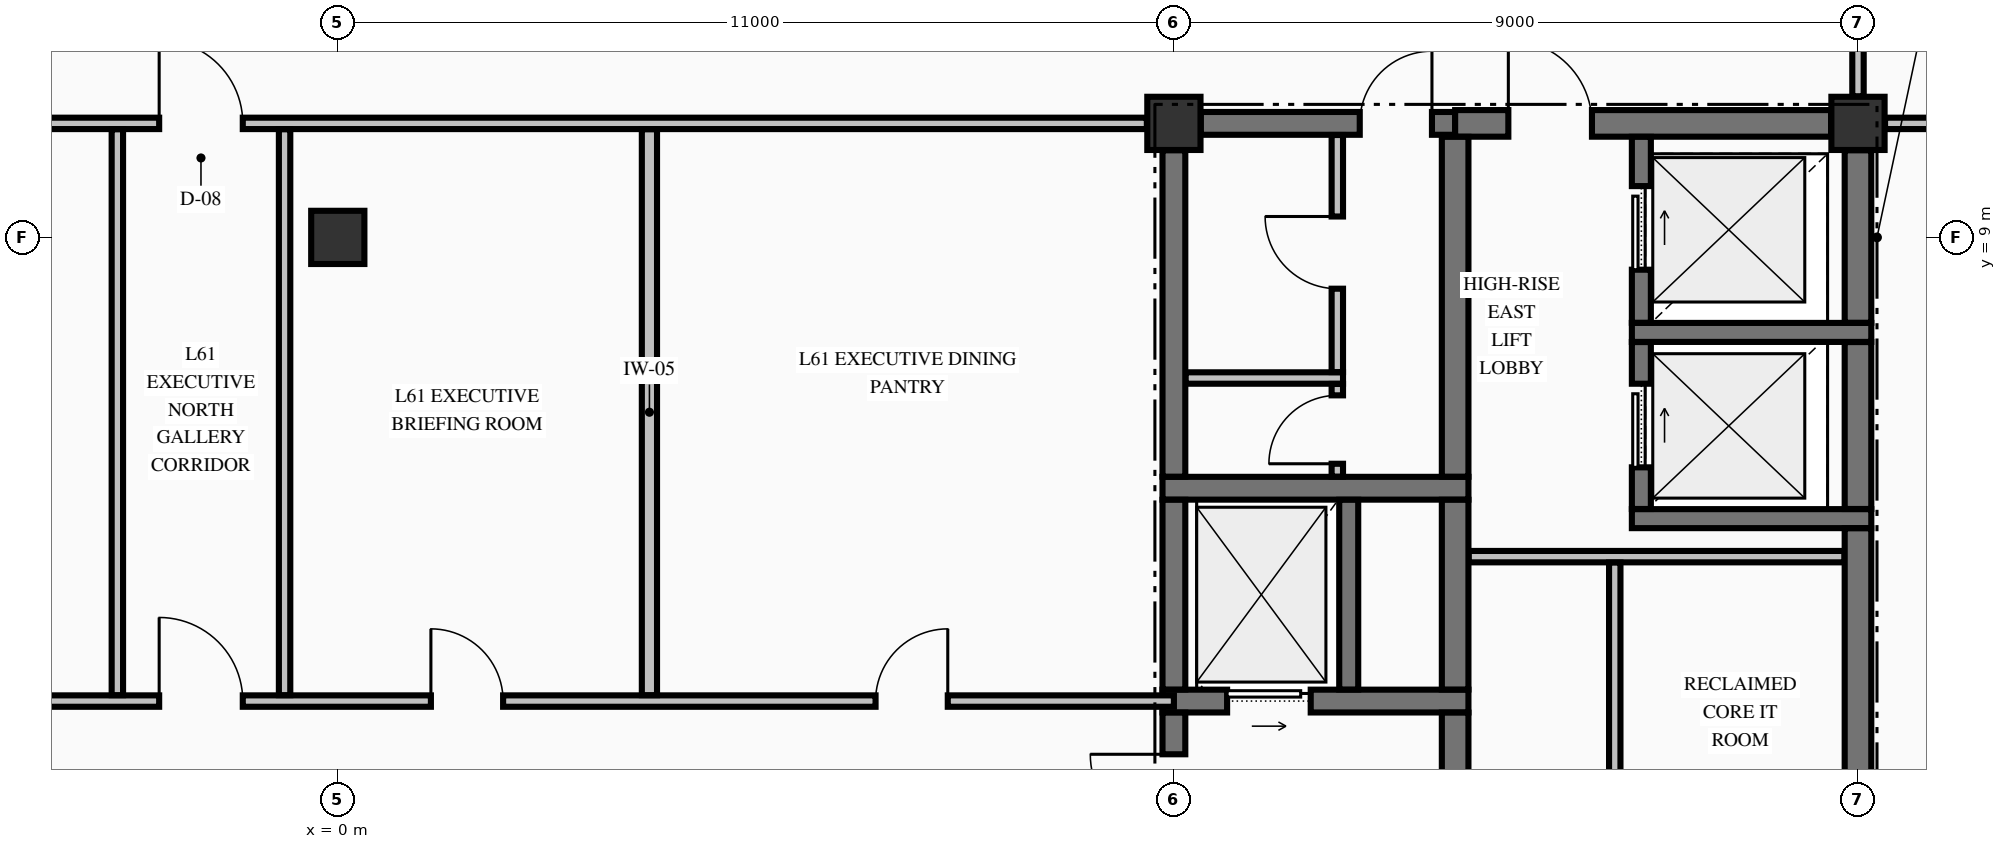
"""IFC4 building model, lengths in metres.
Left out: names, types, materials, properties, quantities, classifications, styles, units other than length and angle.
Written with IfcOpenShell. Run it as: python <this file> out.ifc"""

import sys

from ifc_helpers import new_model, si_unit, direction, frame, frame_2d, origin, origin_2d, place, context, subcontext, project, spatial, rectangle, extrude, element, fill, save


model = new_model("IFC4")
c1 = context("Model", 3, precision=1e-05, world=origin(), true_north=direction((0.0, 1.0)))
c2 = subcontext(c1, "Body", "Model", "MODEL_VIEW")
j1 = project(units=[si_unit("LENGTHUNIT", "METRE"), si_unit("PLANEANGLEUNIT", "RADIAN")], contexts=[c1])
p1 = place(None, origin())
s1 = spatial("IfcSite", under=j1, at=p1, CompositionType="ELEMENT")
p2 = place(p1, origin())
s2 = spatial("IfcBuilding", under=s1, at=p2, CompositionType="ELEMENT")
p3 = place(p2, frame((0.0, 0.0, 233.28)))
s3 = spatial("IfcBuildingStorey", under=s2, at=p3, CompositionType="ELEMENT", Elevation=233.28)
for number, where, z_axis, x_axis in (
    (1, (11.0, 10.5, -0.25), (0.0, 0.0, 1.0), (1.0, 0.0, 0.0)),
    (2, (20.0, 10.5, -0.25), (0.0, 0.0, 1.0), (1.0, 0.0, 0.0)),
    (3, (0.0, 9.0, -0.25), (0.0, 0.0, 1.0), (1.0, 0.0, 0.0)),
):
    element("IfcColumn", number, at=place(p3, frame(where, z_axis=z_axis, x_axis=x_axis)), inside=s3, PredefinedType="COLUMN", context=c2, shape_type="SweptSolid", body=[
        extrude(rectangle(XDim=0.7, YDim=0.7, at=origin_2d()), origin(), (0.0, 0.0, 1.0), 3.23),
    ])
p4 = place(p3, frame((10.85, 2.9, 0.0), z_axis=(0.0, 0.0, 1.0), x_axis=(1.0, 0.0, 0.0)))
e4 = element("IfcWall", 4, at=p4, inside=s3, PredefinedType="SHEAR", context=c2, shape_type="SweptSolid", body=[
    extrude(rectangle(XDim=4.025, YDim=0.3, at=frame_2d((2.012, 0.0))), origin(), (0.0, 0.0, 1.0), 2.98),
])
p5 = place(p4, frame((0.85, 0.0, 0.0)))
e5 = element("IfcOpeningElement", 5, at=p5, cuts=e4, PredefinedType="OPENING", context=c2, shape_type="SweptSolid", body=[
    extrude(rectangle(XDim=1.1, YDim=2.2, at=frame_2d((0.55, 1.1))), frame((0.0, 0.16, 0.0), z_axis=(0.0, -1.0, 0.0), x_axis=(1.0, 0.0, 0.0)), (0.0, 0.0, 1.0), 0.32),
])
p6 = place(p3, frame((17.025, 5.3, 0.0), z_axis=(0.0, 0.0, 1.0), x_axis=(1.0, 0.0, 0.0)))
e6 = element("IfcWall", 6, at=p6, inside=s3, PredefinedType="SOLIDWALL", context=c2, shape_type="SweptSolid", body=[
    extrude(rectangle(XDim=3.15, YDim=0.25, at=frame_2d((1.575, 0.0))), origin(), (0.0, 0.0, 1.0), 2.98),
])
p7 = place(p3, frame((10.85, 5.7, 0.0), z_axis=(0.0, 0.0, 1.0), x_axis=(1.0, 0.0, 0.0)))
e7 = element("IfcWall", 7, at=p7, inside=s3, PredefinedType="SHEAR", context=c2, shape_type="SweptSolid", body=[
    extrude(rectangle(XDim=4.025, YDim=0.3, at=frame_2d((2.012, 0.0))), origin(), (0.0, 0.0, 1.0), 2.98),
])
p8 = place(p3, frame((17.025, 7.75, 0.0), z_axis=(0.0, 0.0, 1.0), x_axis=(1.0, 0.0, 0.0)))
e8 = element("IfcWall", 8, at=p8, inside=s3, PredefinedType="SOLIDWALL", context=c2, shape_type="SweptSolid", body=[
    extrude(rectangle(XDim=3.15, YDim=0.25, at=frame_2d((1.575, 0.0))), origin(), (0.0, 0.0, 1.0), 2.98),
])
p9 = place(p3, frame((11.354, 10.5, 0.0), z_axis=(0.0, 0.0, 1.0), x_axis=(1.0, 0.0, 0.0)))
e9 = element("IfcWall", 9, at=p9, inside=s3, PredefinedType="SHEAR", context=c2, shape_type="SweptSolid", body=[
    extrude(rectangle(XDim=3.346, YDim=0.3, at=frame_2d((1.673, 0.0))), origin(), (0.0, 0.0, 1.0), 2.98),
])
p10 = place(p9, frame((2.091, 0.0, 0.0)))
e10 = element("IfcOpeningElement", 10, at=p10, cuts=e9, PredefinedType="OPENING", context=c2, shape_type="SweptSolid", body=[
    extrude(rectangle(XDim=0.95, YDim=2.15, at=frame_2d((0.475, 1.075))), frame((0.0, 0.16, 0.0), z_axis=(0.0, -1.0, 0.0), x_axis=(1.0, 0.0, 0.0)), (0.0, 0.0, 1.0), 0.32),
])
p11 = place(p3, frame((14.7, 10.5, 0.0), z_axis=(0.0, 0.0, 1.0), x_axis=(1.0, 0.0, 0.0)))
e11 = element("IfcWall", 11, at=p11, inside=s3, PredefinedType="SHEAR", context=c2, shape_type="SweptSolid", body=[
    extrude(rectangle(XDim=4.946, YDim=0.35, at=frame_2d((2.473, 0.0))), origin(), (0.0, 0.0, 1.0), 2.98),
])
p12 = place(p11, frame((0.7, 0.0, 0.0)))
e12 = element("IfcOpeningElement", 12, at=p12, cuts=e11, PredefinedType="OPENING", context=c2, shape_type="SweptSolid", body=[
    extrude(rectangle(XDim=1.1, YDim=2.15, at=frame_2d((0.55, 1.075))), frame((0.0, 0.185, 0.0), z_axis=(0.0, -1.0, 0.0), x_axis=(1.0, 0.0, 0.0)), (0.0, 0.0, 1.0), 0.37),
])
p13 = place(p3, frame((-11.0, 2.9, 0.0), z_axis=(0.0, 0.0, 1.0), x_axis=(1.0, 0.0, 0.0)))
e13 = element("IfcWall", 13, at=p13, inside=s3, PredefinedType="PARTITIONING", context=c2, shape_type="SweptSolid", body=[
    extrude(rectangle(XDim=22.0, YDim=0.15, at=frame_2d((11.0, 0.0))), origin(), (0.0, 0.0, 1.0), 2.98),
])
p14 = place(p13, frame((8.65, 0.0, 0.0)))
e14 = element("IfcOpeningElement", 14, at=p14, cuts=e13, PredefinedType="OPENING", context=c2, shape_type="SweptSolid", body=[
    extrude(rectangle(XDim=1.1, YDim=2.15, at=frame_2d((0.55, 1.075))), frame((0.0, 0.085, 0.0), z_axis=(0.0, -1.0, 0.0), x_axis=(1.0, 0.0, 0.0)), (0.0, 0.0, 1.0), 0.17),
])
p15 = place(p13, frame((3.525, 0.0, 0.0)))
e15 = element("IfcOpeningElement", 15, at=p15, cuts=e13, PredefinedType="OPENING", context=c2, shape_type="SweptSolid", body=[
    extrude(rectangle(XDim=1.05, YDim=2.15, at=frame_2d((0.525, 1.075))), frame((0.0, 0.085, 0.0), z_axis=(0.0, -1.0, 0.0), x_axis=(1.0, 0.0, 0.0)), (0.0, 0.0, 1.0), 0.17),
])
p16 = place(p13, frame((12.225, 0.0, 0.0)))
e16 = element("IfcOpeningElement", 16, at=p16, cuts=e13, PredefinedType="OPENING", context=c2, shape_type="SweptSolid", body=[
    extrude(rectangle(XDim=0.95, YDim=2.15, at=frame_2d((0.475, 1.075))), frame((0.0, 0.085, 0.0), z_axis=(0.0, -1.0, 0.0), x_axis=(1.0, 0.0, 0.0)), (0.0, 0.0, 1.0), 0.17),
])
p17 = place(p13, frame((18.075, 0.0, 0.0)))
e17 = element("IfcOpeningElement", 17, at=p17, cuts=e13, PredefinedType="OPENING", context=c2, shape_type="SweptSolid", body=[
    extrude(rectangle(XDim=0.95, YDim=2.15, at=frame_2d((0.475, 1.075))), frame((0.0, 0.085, 0.0), z_axis=(0.0, -1.0, 0.0), x_axis=(1.0, 0.0, 0.0)), (0.0, 0.0, 1.0), 0.17),
])
p18 = place(p3, frame((14.878, 4.8, 0.0), z_axis=(0.0, 0.0, 1.0), x_axis=(1.0, 0.0, 0.0)))
e18 = element("IfcWall", 18, at=p18, inside=s3, PredefinedType="PARTITIONING", context=c2, shape_type="SweptSolid", body=[
    extrude(rectangle(XDim=4.944, YDim=0.15, at=frame_2d((2.472, 0.0))), origin(), (0.0, 0.0, 1.0), 2.98),
])
p19 = place(p3, frame((11.153, 7.15, 0.0), z_axis=(0.0, 0.0, 1.0), x_axis=(1.0, 0.0, 0.0)))
e19 = element("IfcWall", 19, at=p19, inside=s3, PredefinedType="PARTITIONING", context=c2, shape_type="SweptSolid", body=[
    extrude(rectangle(XDim=2.072, YDim=0.15, at=frame_2d((1.036, 0.0))), origin(), (0.0, 0.0, 1.0), 2.98),
])
p20 = place(p3, frame((-10.644, 10.5, 0.0), z_axis=(0.0, 0.0, 1.0), x_axis=(1.0, 0.0, 0.0)))
e20 = element("IfcWall", 20, at=p20, inside=s3, PredefinedType="PARTITIONING", context=c2, shape_type="SweptSolid", body=[
    extrude(rectangle(XDim=21.288, YDim=0.15, at=frame_2d((10.644, 0.0))), origin(), (0.0, 0.0, 1.0), 2.98),
])
p21 = place(p20, frame((8.294, 0.0, 0.0)))
e21 = element("IfcOpeningElement", 21, at=p21, cuts=e20, PredefinedType="OPENING", context=c2, shape_type="SweptSolid", body=[
    extrude(rectangle(XDim=1.1, YDim=2.15, at=frame_2d((0.55, 1.075))), frame((0.0, 0.085, 0.0), z_axis=(0.0, -1.0, 0.0), x_axis=(1.0, 0.0, 0.0)), (0.0, 0.0, 1.0), 0.17),
])
p22 = place(p3, frame((20.356, 10.5, 0.0), z_axis=(0.0, 0.0, 1.0), x_axis=(1.0, 0.0, 0.0)))
e22 = element("IfcWall", 22, at=p22, inside=s3, PredefinedType="PARTITIONING", context=c2, shape_type="SweptSolid", body=[
    extrude(rectangle(XDim=5.479, YDim=0.15, at=frame_2d((2.74, 0.0))), origin(), (0.0, 0.0, 1.0), 2.98),
])
p23 = place(p22, frame((2.169, 0.0, 0.0)))
e23 = element("IfcOpeningElement", 23, at=p23, cuts=e22, PredefinedType="OPENING", context=c2, shape_type="SweptSolid", body=[
    extrude(rectangle(XDim=0.95, YDim=2.15, at=frame_2d((0.475, 1.075))), frame((0.0, 0.085, 0.0), z_axis=(0.0, -1.0, 0.0), x_axis=(1.0, 0.0, 0.0)), (0.0, 0.0, 1.0), 0.17),
])
p24 = place(p3, frame((11.0, 0.354, 0.0), z_axis=(0.0, 0.0, 1.0), x_axis=(0.0, 1.0, 0.0)))
e24 = element("IfcWall", 24, at=p24, inside=s3, PredefinedType="SHEAR", context=c2, shape_type="SweptSolid", body=[
    extrude(rectangle(XDim=2.394, YDim=0.3, at=frame_2d((1.197, 0.0))), origin(), (0.0, 0.0, 1.0), 2.98),
])
p25 = place(p24, frame((0.746, 0.0, 0.0)))
e25 = element("IfcOpeningElement", 25, at=p25, cuts=e24, PredefinedType="OPENING", context=c2, shape_type="SweptSolid", body=[
    extrude(rectangle(XDim=1.1, YDim=2.15, at=frame_2d((0.55, 1.075))), frame((0.0, 0.16, 0.0), z_axis=(0.0, -1.0, 0.0), x_axis=(1.0, 0.0, 0.0)), (0.0, 0.0, 1.0), 0.32),
])
p26 = place(p3, frame((11.0, 3.052, 0.0), z_axis=(0.0, 0.0, 1.0), x_axis=(0.0, 1.0, 0.0)))
e26 = element("IfcWall", 26, at=p26, inside=s3, PredefinedType="SHEAR", context=c2, shape_type="SweptSolid", body=[
    extrude(rectangle(XDim=2.496, YDim=0.3, at=frame_2d((1.248, 0.0))), origin(), (0.0, 0.0, 1.0), 2.98),
])
p27 = place(p3, frame((11.0, 5.852, 0.0), z_axis=(0.0, 0.0, 1.0), x_axis=(0.0, 1.0, 0.0)))
e27 = element("IfcWall", 27, at=p27, inside=s3, PredefinedType="SHEAR", context=c2, shape_type="SweptSolid", body=[
    extrude(rectangle(XDim=4.294, YDim=0.3, at=frame_2d((2.147, 0.0))), origin(), (0.0, 0.0, 1.0), 2.98),
])
p28 = place(p3, frame((13.3, 3.052, 0.0), z_axis=(0.0, 0.0, 1.0), x_axis=(0.0, 1.0, 0.0)))
e28 = element("IfcWall", 28, at=p28, inside=s3, PredefinedType="SOLIDWALL", context=c2, shape_type="SweptSolid", body=[
    extrude(rectangle(XDim=2.496, YDim=0.25, at=frame_2d((1.248, 0.0))), origin(), (0.0, 0.0, 1.0), 2.98),
])
p29 = place(p3, frame((14.7, -0.098, 0.0), z_axis=(0.0, 0.0, 1.0), x_axis=(0.0, 1.0, 0.0)))
e29 = element("IfcWall", 29, at=p29, inside=s3, PredefinedType="SHEAR", context=c2, shape_type="SweptSolid", body=[
    extrude(rectangle(XDim=2.846, YDim=0.35, at=frame_2d((1.423, 0.0))), origin(), (0.0, 0.0, 1.0), 2.98),
])
p30 = place(p3, frame((14.7, 3.052, 0.0), z_axis=(0.0, 0.0, 1.0), x_axis=(0.0, 1.0, 0.0)))
e30 = element("IfcWall", 30, at=p30, inside=s3, PredefinedType="SHEAR", context=c2, shape_type="SweptSolid", body=[
    extrude(rectangle(XDim=2.496, YDim=0.35, at=frame_2d((1.248, 0.0))), origin(), (0.0, 0.0, 1.0), 2.98),
])
p31 = place(p3, frame((14.7, 5.852, 0.0), z_axis=(0.0, 0.0, 1.0), x_axis=(0.0, 1.0, 0.0)))
e31 = element("IfcWall", 31, at=p31, inside=s3, PredefinedType="SHEAR", context=c2, shape_type="SweptSolid", body=[
    extrude(rectangle(XDim=4.471, YDim=0.35, at=frame_2d((2.235, 0.0))), origin(), (0.0, 0.0, 1.0), 2.98),
])
p32 = place(p3, frame((17.15, 5.427, 0.0), z_axis=(0.0, 0.0, 1.0), x_axis=(0.0, 1.0, 0.0)))
e32 = element("IfcWall", 32, at=p32, inside=s3, PredefinedType="SOLIDWALL", context=c2, shape_type="SweptSolid", body=[
    extrude(rectangle(XDim=2.196, YDim=0.25, at=frame_2d((1.098, 0.0))), origin(), (0.0, 0.0, 1.0), 2.98),
])
p33 = place(p32, frame((0.548, 0.0, 0.0)))
e33 = element("IfcOpeningElement", 33, at=p33, cuts=e32, PredefinedType="OPENING", context=c2, shape_type="SweptSolid", body=[
    extrude(rectangle(XDim=1.1, YDim=2.2, at=frame_2d((0.55, 1.1))), frame((0.0, 0.135, 0.0), z_axis=(0.0, -1.0, 0.0), x_axis=(1.0, 0.0, 0.0)), (0.0, 0.0, 1.0), 0.27),
])
p34 = place(p3, frame((17.15, 7.877, 0.0), z_axis=(0.0, 0.0, 1.0), x_axis=(0.0, 1.0, 0.0)))
e34 = element("IfcWall", 34, at=p34, inside=s3, PredefinedType="SOLIDWALL", context=c2, shape_type="SweptSolid", body=[
    extrude(rectangle(XDim=2.446, YDim=0.25, at=frame_2d((1.223, 0.0))), origin(), (0.0, 0.0, 1.0), 2.98),
])
p35 = place(p34, frame((0.698, 0.0, 0.0)))
e35 = element("IfcOpeningElement", 35, at=p35, cuts=e34, PredefinedType="OPENING", context=c2, shape_type="SweptSolid", body=[
    extrude(rectangle(XDim=1.1, YDim=2.2, at=frame_2d((0.55, 1.1))), frame((0.0, 0.135, 0.0), z_axis=(0.0, -1.0, 0.0), x_axis=(1.0, 0.0, 0.0)), (0.0, 0.0, 1.0), 0.27),
])
p36 = place(p3, frame((20.0, 0.354, 0.0), z_axis=(0.0, 0.0, 1.0), x_axis=(0.0, 1.0, 0.0)))
e36 = element("IfcWall", 36, at=p36, inside=s3, PredefinedType="SHEAR", context=c2, shape_type="SweptSolid", body=[
    extrude(rectangle(XDim=4.819, YDim=0.35, at=frame_2d((2.41, 0.0))), origin(), (0.0, 0.0, 1.0), 2.98),
])
p37 = place(p3, frame((20.0, 5.427, 0.0), z_axis=(0.0, 0.0, 1.0), x_axis=(0.0, 1.0, 0.0)))
e37 = element("IfcWall", 37, at=p37, inside=s3, PredefinedType="SHEAR", context=c2, shape_type="SweptSolid", body=[
    extrude(rectangle(XDim=2.196, YDim=0.35, at=frame_2d((1.098, 0.0))), origin(), (0.0, 0.0, 1.0), 2.98),
])
p38 = place(p3, frame((20.0, 7.877, 0.0), z_axis=(0.0, 0.0, 1.0), x_axis=(0.0, 1.0, 0.0)))
e38 = element("IfcWall", 38, at=p38, inside=s3, PredefinedType="SHEAR", context=c2, shape_type="SweptSolid", body=[
    extrude(rectangle(XDim=2.269, YDim=0.35, at=frame_2d((1.135, 0.0))), origin(), (0.0, 0.0, 1.0), 2.98),
])
for number, where, z_axis, x_axis in (
    (39, (-2.9, 2.978, 0.0), (0.0, 0.0, 1.0), (0.0, 1.0, 0.0)),
    (40, (-0.7, 2.978, 0.0), (0.0, 0.0, 1.0), (0.0, 1.0, 0.0)),
):
    element("IfcWall", number, at=place(p3, frame(where, z_axis=z_axis, x_axis=x_axis)), inside=s3, PredefinedType="PARTITIONING", context=c2, shape_type="SweptSolid", body=[
        extrude(rectangle(XDim=7.444, YDim=0.15, at=frame_2d((3.722, 0.0))), origin(), (0.0, 0.0, 1.0), 2.98),
    ])
p39 = place(p3, frame((4.1, 2.978, 0.0), z_axis=(0.0, 0.0, 1.0), x_axis=(0.0, 1.0, 0.0)))
e41 = element("IfcWall", 41, at=p39, inside=s3, PredefinedType="PARTITIONING", context=c2, shape_type="SweptSolid", body=[
    extrude(rectangle(XDim=7.444, YDim=0.2, at=frame_2d((3.722, 0.0))), origin(), (0.0, 0.0, 1.0), 2.98),
])
p40 = place(p3, frame((13.15, 5.853, 0.0), z_axis=(0.0, 0.0, 1.0), x_axis=(0.0, 1.0, 0.0)))
e42 = element("IfcWall", 42, at=p40, inside=s3, PredefinedType="PARTITIONING", context=c2, shape_type="SweptSolid", body=[
    extrude(rectangle(XDim=1.219, YDim=0.15, at=frame_2d((0.609, 0.0))), origin(), (0.0, 0.0, 1.0), 2.98),
])
p41 = place(p40, frame((0.169, 0.0, 0.0)))
e43 = element("IfcOpeningElement", 43, at=p41, cuts=e42, PredefinedType="OPENING", context=c2, shape_type="SweptSolid", body=[
    extrude(rectangle(XDim=0.9, YDim=2.15, at=frame_2d((0.45, 1.075))), frame((0.0, 0.085, 0.0), z_axis=(0.0, -1.0, 0.0), x_axis=(1.0, 0.0, 0.0)), (0.0, 0.0, 1.0), 0.17),
])
p42 = place(p3, frame((13.15, 7.228, 0.0), z_axis=(0.0, 0.0, 1.0), x_axis=(0.0, 1.0, 0.0)))
e44 = element("IfcWall", 44, at=p42, inside=s3, PredefinedType="PARTITIONING", context=c2, shape_type="SweptSolid", body=[
    extrude(rectangle(XDim=3.119, YDim=0.15, at=frame_2d((1.56, 0.0))), origin(), (0.0, 0.0, 1.0), 2.98),
])
p43 = place(p42, frame((1.097, 0.0, 0.0)))
e45 = element("IfcOpeningElement", 45, at=p43, cuts=e44, PredefinedType="OPENING", context=c2, shape_type="SweptSolid", body=[
    extrude(rectangle(XDim=0.95, YDim=2.15, at=frame_2d((0.475, 1.075))), frame((0.0, 0.085, 0.0), z_axis=(0.0, -1.0, 0.0), x_axis=(1.0, 0.0, 0.0)), (0.0, 0.0, 1.0), 0.17),
])
p44 = place(p3, frame((16.8, -2.422, 0.0), z_axis=(0.0, 0.0, 1.0), x_axis=(0.0, 1.0, 0.0)))
e46 = element("IfcWall", 46, at=p44, inside=s3, PredefinedType="PARTITIONING", context=c2, shape_type="SweptSolid", body=[
    extrude(rectangle(XDim=7.144, YDim=0.15, at=frame_2d((3.572, 0.0))), origin(), (0.0, 0.0, 1.0), 2.98),
])
p45 = place(p3, frame((20.0, 10.856, 0.0), z_axis=(0.0, 0.0, 1.0), x_axis=(0.0, 1.0, 0.0)))
e47 = element("IfcWall", 47, at=p45, inside=s3, PredefinedType="PARTITIONING", context=c2, shape_type="SweptSolid", body=[
    extrude(rectangle(XDim=2.666, YDim=0.15, at=frame_2d((1.333, 0.0))), origin(), (0.0, 0.0, 1.0), 2.98),
])
p46 = place(p45, frame((0.719, 0.0, 0.0)))
e48 = element("IfcOpeningElement", 48, at=p46, cuts=e47, PredefinedType="OPENING", context=c2, shape_type="SweptSolid", body=[
    extrude(rectangle(XDim=0.95, YDim=2.15, at=frame_2d((0.475, 1.075))), frame((0.0, 0.085, 0.0), z_axis=(0.0, -1.0, 0.0), x_axis=(1.0, 0.0, 0.0)), (0.0, 0.0, 1.0), 0.17),
])
p47 = place(p25, origin())
e49 = element("IfcDoor", 49, at=p47, inside=s3, OperationType="SINGLE_SWING_RIGHT", PredefinedType="DOOR", context=c2, shape_type="SweptSolid", body=[
    extrude(rectangle(XDim=1.1, YDim=2.15, at=frame_2d((0.55, 1.075))), frame((0.0, 0.025, 0.0), z_axis=(0.0, -1.0, 0.0), x_axis=(1.0, 0.0, 0.0)), (0.0, 0.0, 1.0), 0.05),
])
fill(e25, e49)
p48 = place(p5, origin())
e50 = element("IfcDoor", 50, at=p48, inside=s3, OperationType="SLIDING_TO_RIGHT", PredefinedType="DOOR", context=c2, shape_type="SweptSolid", body=[
    extrude(rectangle(XDim=1.1, YDim=2.2, at=frame_2d((0.55, 1.1))), frame((0.0, 0.025, 0.0), z_axis=(0.0, -1.0, 0.0), x_axis=(1.0, 0.0, 0.0)), (0.0, 0.0, 1.0), 0.05),
])
fill(e5, e50)
p49 = place(p10, origin())
e51 = element("IfcDoor", 51, at=p49, inside=s3, OperationType="SINGLE_SWING_RIGHT", PredefinedType="DOOR", context=c2, shape_type="SweptSolid", body=[
    extrude(rectangle(XDim=0.95, YDim=2.15, at=frame_2d((0.475, 1.075))), frame((0.0, 0.025, 0.0), z_axis=(0.0, -1.0, 0.0), x_axis=(1.0, 0.0, 0.0)), (0.0, 0.0, 1.0), 0.05),
])
fill(e10, e51)
p50 = place(p41, origin())
e52 = element("IfcDoor", 52, at=p50, inside=s3, OperationType="SINGLE_SWING_LEFT", PredefinedType="DOOR", context=c2, shape_type="SweptSolid", body=[
    extrude(rectangle(XDim=0.9, YDim=2.15, at=frame_2d((0.45, 1.075))), frame((0.0, 0.025, 0.0), z_axis=(0.0, -1.0, 0.0), x_axis=(1.0, 0.0, 0.0)), (0.0, 0.0, 1.0), 0.05),
])
fill(e43, e52)
p51 = place(p43, origin())
e53 = element("IfcDoor", 53, at=p51, inside=s3, OperationType="SINGLE_SWING_RIGHT", PredefinedType="DOOR", context=c2, shape_type="SweptSolid", body=[
    extrude(rectangle(XDim=0.95, YDim=2.15, at=frame_2d((0.475, 1.075))), frame((0.0, 0.025, 0.0), z_axis=(0.0, -1.0, 0.0), x_axis=(1.0, 0.0, 0.0)), (0.0, 0.0, 1.0), 0.05),
])
fill(e45, e53)
p52 = place(p33, origin())
e54 = element("IfcDoor", 54, at=p52, inside=s3, OperationType="SLIDING_TO_RIGHT", PredefinedType="DOOR", context=c2, shape_type="SweptSolid", body=[
    extrude(rectangle(XDim=1.1, YDim=2.2, at=frame_2d((0.55, 1.1))), frame((0.0, 0.025, 0.0), z_axis=(0.0, -1.0, 0.0), x_axis=(1.0, 0.0, 0.0)), (0.0, 0.0, 1.0), 0.05),
])
fill(e33, e54)
p53 = place(p35, origin())
e55 = element("IfcDoor", 55, at=p53, inside=s3, OperationType="SLIDING_TO_RIGHT", PredefinedType="DOOR", context=c2, shape_type="SweptSolid", body=[
    extrude(rectangle(XDim=1.1, YDim=2.2, at=frame_2d((0.55, 1.1))), frame((0.0, 0.025, 0.0), z_axis=(0.0, -1.0, 0.0), x_axis=(1.0, 0.0, 0.0)), (0.0, 0.0, 1.0), 0.05),
])
fill(e35, e55)
p54 = place(p12, origin())
e56 = element("IfcDoor", 56, at=p54, inside=s3, OperationType="SINGLE_SWING_LEFT", PredefinedType="DOOR", context=c2, shape_type="SweptSolid", body=[
    extrude(rectangle(XDim=1.1, YDim=2.15, at=frame_2d((0.55, 1.075))), frame((0.0, 0.025, 0.0), z_axis=(0.0, -1.0, 0.0), x_axis=(1.0, 0.0, 0.0)), (0.0, 0.0, 1.0), 0.05),
])
fill(e12, e56)
p55 = place(p21, origin())
e57 = element("IfcDoor", 57, at=p55, inside=s3, OperationType="SINGLE_SWING_LEFT", PredefinedType="DOOR", context=c2, shape_type="SweptSolid", body=[
    extrude(rectangle(XDim=1.1, YDim=2.15, at=frame_2d((0.55, 1.075))), frame((0.0, 0.025, 0.0), z_axis=(0.0, -1.0, 0.0), x_axis=(1.0, 0.0, 0.0)), (0.0, 0.0, 1.0), 0.05),
])
fill(e21, e57)
p56 = place(p14, origin())
e58 = element("IfcDoor", 58, at=p56, inside=s3, OperationType="SINGLE_SWING_LEFT", PredefinedType="DOOR", context=c2, shape_type="SweptSolid", body=[
    extrude(rectangle(XDim=1.1, YDim=2.15, at=frame_2d((0.55, 1.075))), frame((0.0, 0.025, 0.0), z_axis=(0.0, -1.0, 0.0), x_axis=(1.0, 0.0, 0.0)), (0.0, 0.0, 1.0), 0.05),
])
fill(e14, e58)
p57 = place(p16, origin())
e59 = element("IfcDoor", 59, at=p57, inside=s3, OperationType="SINGLE_SWING_LEFT", PredefinedType="DOOR", context=c2, shape_type="SweptSolid", body=[
    extrude(rectangle(XDim=0.95, YDim=2.15, at=frame_2d((0.475, 1.075))), frame((0.0, 0.025, 0.0), z_axis=(0.0, -1.0, 0.0), x_axis=(1.0, 0.0, 0.0)), (0.0, 0.0, 1.0), 0.05),
])
fill(e16, e59)
p58 = place(p17, origin())
e60 = element("IfcDoor", 60, at=p58, inside=s3, OperationType="SINGLE_SWING_RIGHT", PredefinedType="DOOR", context=c2, shape_type="SweptSolid", body=[
    extrude(rectangle(XDim=0.95, YDim=2.15, at=frame_2d((0.475, 1.075))), frame((0.0, 0.025, 0.0), z_axis=(0.0, -1.0, 0.0), x_axis=(1.0, 0.0, 0.0)), (0.0, 0.0, 1.0), 0.05),
])
fill(e17, e60)
save(model, sys.argv[1])
